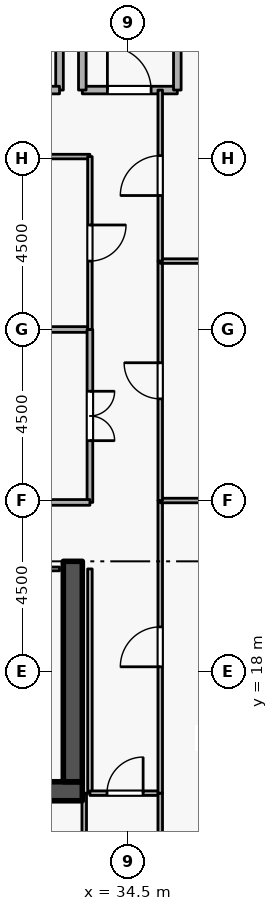
"""IFC4 building model, lengths in metres.
Left out: names, types, materials, properties, quantities, classifications, styles, units other than length and angle.
Written with IfcOpenShell. Run it as: python <this file> out.ifc"""

import sys

from ifc_helpers import new_model, si_unit, direction, frame, frame_2d, origin, place, context, subcontext, project, spatial, rectangle, extrude, element, fill, save


model = new_model("IFC4")
c1 = context("Model", 3, precision=1e-05, world=origin(), true_north=direction((0.0, 1.0)))
c2 = subcontext(c1, "Body", "Model", "MODEL_VIEW")
j1 = project(units=[si_unit("LENGTHUNIT", "METRE"), si_unit("PLANEANGLEUNIT", "RADIAN")], contexts=[c1])
p1 = place(None, origin())
s1 = spatial("IfcSite", under=j1, at=p1, CompositionType="ELEMENT")
p2 = place(p1, origin())
s2 = spatial("IfcBuilding", under=s1, at=p2, CompositionType="ELEMENT")
p3 = place(p2, frame((0.0, 0.0, 240.3)))
s3 = spatial("IfcBuildingStorey", under=s2, at=p3, CompositionType="ELEMENT", Elevation=240.3)
p4 = place(p3, frame((17.7, 14.85, 0.0), z_axis=(0.0, 0.0, 1.0), x_axis=(1.0, 0.0, 0.0)))
e1 = element("IfcWall", 1, at=p4, inside=s3, PredefinedType="SHEAR", context=c2, shape_type="SweptSolid", body=[
    extrude(rectangle(XDim=15.6, YDim=0.5, at=frame_2d((7.8, 0.0))), origin(), (0.0, 0.0, 1.0), 3.6),
])
p5 = place(p3, frame((33.05, 15.1, 0.0), z_axis=(0.0, 0.0, 1.0), x_axis=(0.0, 1.0, 0.0)))
e2 = element("IfcWall", 2, at=p5, inside=s3, PredefinedType="SHEAR", context=c2, shape_type="SweptSolid", body=[
    extrude(rectangle(XDim=5.8, YDim=0.5, at=frame_2d((2.9, 0.0))), origin(), (0.0, 0.0, 1.0), 3.6),
])
p6 = place(p3, frame((33.3, 33.3, 0.0), z_axis=(0.0, 0.0, 1.0), x_axis=(1.0, 0.0, 0.0)))
e3 = element("IfcWall", 3, at=p6, inside=s3, PredefinedType="STANDARD", context=c2, shape_type="SweptSolid", body=[
    extrude(rectangle(XDim=2.5, YDim=0.2, at=frame_2d((1.25, 0.0))), origin(), (0.0, 0.0, 1.0), 3.34),
])
p7 = place(p6, frame((0.66, 0.0, 0.0)))
e4 = element("IfcOpeningElement", 4, at=p7, cuts=e3, PredefinedType="OPENING", context=c2, shape_type="SweptSolid", body=[
    extrude(rectangle(XDim=1.15, YDim=2.1, at=frame_2d((0.575, 1.05))), frame((0.0, 0.11, 0.0), z_axis=(0.0, -1.0, 0.0), x_axis=(1.0, 0.0, 0.0)), (0.0, 0.0, 1.0), 0.22),
])
p8 = place(p3, frame((35.8, 33.3, 0.0), z_axis=(0.0, 0.0, 1.0), x_axis=(0.0, 1.0, 0.0)))
e5 = element("IfcWall", 5, at=p8, inside=s3, PredefinedType="STANDARD", context=c2, shape_type="SweptSolid", body=[
    extrude(rectangle(XDim=5.7, YDim=0.2, at=frame_2d((2.85, 0.0))), origin(), (0.0, 0.0, 1.0), 3.34),
])
p9 = place(p3, frame((33.3, 35.6, 0.0), z_axis=(0.0, 0.0, 1.0), x_axis=(0.0, -1.0, 0.0)))
e6 = element("IfcWall", 6, at=p9, inside=s3, PredefinedType="STANDARD", context=c2, shape_type="SweptSolid", body=[
    extrude(rectangle(XDim=2.3, YDim=0.2, at=frame_2d((1.15, 0.0))), origin(), (0.0, 0.0, 1.0), 2.545),
])
p10 = place(p3, frame((32.7, 35.35, 0.0), z_axis=(0.0, 0.0, 1.0), x_axis=(0.0, -1.0, 0.0)))
e7 = element("IfcWall", 7, at=p10, inside=s3, PredefinedType="STANDARD", context=c2, shape_type="SweptSolid", body=[
    extrude(rectangle(XDim=2.05, YDim=0.2, at=frame_2d((1.025, 0.0))), origin(), (0.0, 0.0, 1.0), 2.545),
])
p11 = place(p3, frame((32.7, 33.3, 0.0), z_axis=(0.0, 0.0, 1.0), x_axis=(-1.0, 0.0, 0.0)))
e8 = element("IfcWall", 8, at=p11, inside=s3, PredefinedType="STANDARD", context=c2, shape_type="SweptSolid", body=[
    extrude(rectangle(XDim=2.35, YDim=0.2, at=frame_2d((1.175, 0.0))), origin(), (0.0, 0.0, 1.0), 3.34),
])
p12 = place(p11, frame((0.6, 0.0, 0.0)))
e9 = element("IfcOpeningElement", 9, at=p12, cuts=e8, PredefinedType="OPENING", context=c2, shape_type="SweptSolid", body=[
    extrude(rectangle(XDim=1.15, YDim=2.1, at=frame_2d((0.575, 1.05))), frame((0.0, 0.11, 0.0), z_axis=(0.0, -1.0, 0.0), x_axis=(1.0, 0.0, 0.0)), (0.0, 0.0, 1.0), 0.22),
])
p13 = place(p3, frame((30.55, 20.7, 0.0), z_axis=(0.0, 0.0, 1.0), x_axis=(1.0, 0.0, 0.0)))
e10 = element("IfcWall", 10, at=p13, inside=s3, PredefinedType="PARTITIONING", context=c2, shape_type="SweptSolid", body=[
    extrude(rectangle(XDim=2.15, YDim=0.1, at=frame_2d((1.075, 0.0))), origin(), (0.0, 0.0, 1.0), 3.34),
])
p14 = place(p13, frame((0.6, 0.0, 0.0)))
e11 = element("IfcOpeningElement", 11, at=p14, cuts=e10, PredefinedType="OPENING", context=c2, shape_type="SweptSolid", body=[
    extrude(rectangle(XDim=0.95, YDim=2.1, at=frame_2d((0.475, 1.05))), frame((0.0, 0.06, 0.0), z_axis=(0.0, -1.0, 0.0), x_axis=(1.0, 0.0, 0.0)), (0.0, 0.0, 1.0), 0.12),
])
p15 = place(p3, frame((33.5, 20.7, 0.0), z_axis=(0.0, 0.0, 1.0), x_axis=(0.0, -1.0, 0.0)))
e12 = element("IfcWall", 12, at=p15, inside=s3, PredefinedType="PARTITIONING", context=c2, shape_type="SweptSolid", body=[
    extrude(rectangle(XDim=5.9, YDim=0.12, at=frame_2d((2.95, 0.0))), origin(), (0.0, 0.0, 1.0), 3.34),
])
p16 = place(p3, frame((33.5, 14.8, 0.0), z_axis=(0.0, 0.0, 1.0), x_axis=(1.0, 0.0, 0.0)))
e13 = element("IfcWall", 13, at=p16, inside=s3, PredefinedType="PARTITIONING", context=c2, shape_type="SweptSolid", body=[
    extrude(rectangle(XDim=1.85, YDim=0.12, at=frame_2d((0.925, 0.0))), origin(), (0.0, 0.0, 1.0), 3.34),
])
p17 = place(p16, frame((0.45, 0.0, 0.0)))
e14 = element("IfcOpeningElement", 14, at=p17, cuts=e13, PredefinedType="OPENING", context=c2, shape_type="SweptSolid", body=[
    extrude(rectangle(XDim=0.95, YDim=2.1, at=frame_2d((0.475, 1.05))), frame((0.0, 0.07, 0.0), z_axis=(0.0, -1.0, 0.0), x_axis=(1.0, 0.0, 0.0)), (0.0, 0.0, 1.0), 0.14),
])
for number, where, z_axis, x_axis in (
    (15, (35.35, 14.8, 0.0), (0.0, 0.0, 1.0), (0.0, -1.0, 0.0)),
    (16, (33.35, 3.28, 0.0), (0.0, 0.0, 1.0), (0.0, 1.0, 0.0)),
):
    element("IfcWall", number, at=place(p3, frame(where, z_axis=z_axis, x_axis=x_axis)), inside=s3, PredefinedType="PARTITIONING", context=c2, shape_type="SweptSolid", body=[
        extrude(rectangle(XDim=11.52, YDim=0.12, at=frame_2d((5.76, 0.0))), origin(), (0.0, 0.0, 1.0), 3.34),
    ])
p18 = place(p3, frame((35.35, 14.8, 0.0), z_axis=(0.0, 0.0, 1.0), x_axis=(0.0, 1.0, 0.0)))
e17 = element("IfcWall", 17, at=p18, inside=s3, PredefinedType="PARTITIONING", context=c2, shape_type="SweptSolid", body=[
    extrude(rectangle(XDim=7.7, YDim=0.12, at=frame_2d((3.85, 0.0))), origin(), (0.0, 0.0, 1.0), 3.34),
])
p19 = place(p18, frame((3.325, 0.0, 0.0)))
e18 = element("IfcOpeningElement", 18, at=p19, cuts=e17, PredefinedType="OPENING", context=c2, shape_type="SweptSolid", body=[
    extrude(rectangle(XDim=1.05, YDim=2.1, at=frame_2d((0.525, 1.05))), frame((0.0, 0.07, 0.0), z_axis=(0.0, -1.0, 0.0), x_axis=(1.0, 0.0, 0.0)), (0.0, 0.0, 1.0), 0.14),
])
p20 = place(p3, frame((35.35, 22.5, 0.0), z_axis=(0.0, 0.0, 1.0), x_axis=(1.0, 0.0, 0.0)))
e19 = element("IfcWall", 19, at=p20, inside=s3, PredefinedType="PARTITIONING", context=c2, shape_type="SweptSolid", body=[
    extrude(rectangle(XDim=7.87, YDim=0.12, at=frame_2d((3.935, 0.0))), origin(), (0.0, 0.0, 1.0), 3.34),
])
p21 = place(p3, frame((35.35, 22.5, 0.0), z_axis=(0.0, 0.0, 1.0), x_axis=(0.0, 1.0, 0.0)))
e20 = element("IfcWall", 20, at=p21, inside=s3, PredefinedType="PARTITIONING", context=c2, shape_type="SweptSolid", body=[
    extrude(rectangle(XDim=6.3, YDim=0.12, at=frame_2d((3.15, 0.0))), origin(), (0.0, 0.0, 1.0), 3.34),
])
p22 = place(p21, frame((2.675, 0.0, 0.0)))
e21 = element("IfcOpeningElement", 21, at=p22, cuts=e20, PredefinedType="OPENING", context=c2, shape_type="SweptSolid", body=[
    extrude(rectangle(XDim=0.95, YDim=2.1, at=frame_2d((0.475, 1.05))), frame((0.0, 0.07, 0.0), z_axis=(0.0, -1.0, 0.0), x_axis=(1.0, 0.0, 0.0)), (0.0, 0.0, 1.0), 0.14),
])
p23 = place(p3, frame((35.35, 28.8, 0.0), z_axis=(0.0, 0.0, 1.0), x_axis=(1.0, 0.0, 0.0)))
e22 = element("IfcWall", 22, at=p23, inside=s3, PredefinedType="PARTITIONING", context=c2, shape_type="SweptSolid", body=[
    extrude(rectangle(XDim=7.87, YDim=0.12, at=frame_2d((3.935, 0.0))), origin(), (0.0, 0.0, 1.0), 3.34),
])
p24 = place(p3, frame((35.35, 28.8, 0.0), z_axis=(0.0, 0.0, 1.0), x_axis=(0.0, 1.0, 0.0)))
e23 = element("IfcWall", 23, at=p24, inside=s3, PredefinedType="PARTITIONING", context=c2, shape_type="SweptSolid", body=[
    extrude(rectangle(XDim=4.5, YDim=0.12, at=frame_2d((2.25, 0.0))), origin(), (0.0, 0.0, 1.0), 3.34),
])
p25 = place(p24, frame((1.725, 0.0, 0.0)))
e24 = element("IfcOpeningElement", 24, at=p25, cuts=e23, PredefinedType="OPENING", context=c2, shape_type="SweptSolid", body=[
    extrude(rectangle(XDim=1.05, YDim=2.1, at=frame_2d((0.525, 1.05))), frame((0.0, 0.07, 0.0), z_axis=(0.0, -1.0, 0.0), x_axis=(1.0, 0.0, 0.0)), (0.0, 0.0, 1.0), 0.14),
])
p26 = place(p3, frame((30.7, 27.0, 0.0), z_axis=(0.0, 0.0, 1.0), x_axis=(1.0, 0.0, 0.0)))
e25 = element("IfcWall", 25, at=p26, inside=s3, PredefinedType="PARTITIONING", context=c2, shape_type="SweptSolid", body=[
    extrude(rectangle(XDim=2.8, YDim=0.15, at=frame_2d((1.4, 0.0))), origin(), (0.0, 0.0, 1.0), 2.878),
])
p27 = place(p3, frame((33.5, 27.0, 0.0), z_axis=(0.0, 0.0, 1.0), x_axis=(0.0, -1.0, 0.0)))
e26 = element("IfcWall", 26, at=p27, inside=s3, PredefinedType="PARTITIONING", context=c2, shape_type="SweptSolid", body=[
    extrude(rectangle(XDim=4.55, YDim=0.15, at=frame_2d((2.275, 0.0))), origin(), (0.0, 0.0, 1.0), 3.34),
])
p28 = place(p27, frame((1.625, 0.0, 0.0)))
e27 = element("IfcOpeningElement", 27, at=p28, cuts=e26, PredefinedType="OPENING", context=c2, shape_type="SweptSolid", body=[
    extrude(rectangle(XDim=1.3, YDim=2.12, at=frame_2d((0.65, 1.06))), frame((0.0, 0.085, 0.0), z_axis=(0.0, -1.0, 0.0), x_axis=(1.0, 0.0, 0.0)), (0.0, 0.0, 1.0), 0.17),
])
p29 = place(p3, frame((33.5, 22.45, 0.0), z_axis=(0.0, 0.0, 1.0), x_axis=(-1.0, 0.0, 0.0)))
e28 = element("IfcWall", 28, at=p29, inside=s3, PredefinedType="PARTITIONING", context=c2, shape_type="SweptSolid", body=[
    extrude(rectangle(XDim=2.8, YDim=0.15, at=frame_2d((1.4, 0.0))), origin(), (0.0, 0.0, 1.0), 3.34),
])
p30 = place(p3, frame((30.7, 31.55, 0.0), z_axis=(0.0, 0.0, 1.0), x_axis=(1.0, 0.0, 0.0)))
e29 = element("IfcWall", 29, at=p30, inside=s3, PredefinedType="PARTITIONING", context=c2, shape_type="SweptSolid", body=[
    extrude(rectangle(XDim=2.8, YDim=0.12, at=frame_2d((1.4, 0.0))), origin(), (0.0, 0.0, 1.0), 3.34),
])
p31 = place(p3, frame((33.5, 31.55, 0.0), z_axis=(0.0, 0.0, 1.0), x_axis=(0.0, -1.0, 0.0)))
e30 = element("IfcWall", 30, at=p31, inside=s3, PredefinedType="PARTITIONING", context=c2, shape_type="SweptSolid", body=[
    extrude(rectangle(XDim=4.55, YDim=0.12, at=frame_2d((2.275, 0.0))), origin(), (0.0, 0.0, 1.0), 3.34),
])
p32 = place(p31, frame((1.8, 0.0, 0.0)))
e31 = element("IfcOpeningElement", 31, at=p32, cuts=e30, PredefinedType="OPENING", context=c2, shape_type="SweptSolid", body=[
    extrude(rectangle(XDim=0.95, YDim=2.1, at=frame_2d((0.475, 1.05))), frame((0.0, 0.07, 0.0), z_axis=(0.0, -1.0, 0.0), x_axis=(1.0, 0.0, 0.0)), (0.0, 0.0, 1.0), 0.14),
])
p33 = place(p7, origin())
e32 = element("IfcDoor", 32, at=p33, inside=s3, OperationType="SINGLE_SWING_LEFT", PredefinedType="DOOR", context=c2, shape_type="SweptSolid", body=[
    extrude(rectangle(XDim=1.15, YDim=2.1, at=frame_2d((0.575, 1.05))), frame((0.0, 0.025, 0.0), z_axis=(0.0, -1.0, 0.0), x_axis=(1.0, 0.0, 0.0)), (0.0, 0.0, 1.0), 0.05),
])
fill(e4, e32)
p34 = place(p17, origin())
e33 = element("IfcDoor", 33, at=p34, inside=s3, OperationType="SINGLE_SWING_RIGHT", PredefinedType="DOOR", context=c2, shape_type="SweptSolid", body=[
    extrude(rectangle(XDim=0.95, YDim=2.1, at=frame_2d((0.475, 1.05))), frame((0.0, 0.025, 0.0), z_axis=(0.0, -1.0, 0.0), x_axis=(1.0, 0.0, 0.0)), (0.0, 0.0, 1.0), 0.05),
])
fill(e14, e33)
p35 = place(p19, origin())
e34 = element("IfcDoor", 34, at=p35, inside=s3, OperationType="SINGLE_SWING_LEFT", PredefinedType="DOOR", context=c2, shape_type="SweptSolid", body=[
    extrude(rectangle(XDim=1.05, YDim=2.1, at=frame_2d((0.525, 1.05))), frame((0.0, 0.025, 0.0), z_axis=(0.0, -1.0, 0.0), x_axis=(1.0, 0.0, 0.0)), (0.0, 0.0, 1.0), 0.05),
])
fill(e18, e34)
p36 = place(p22, origin())
e35 = element("IfcDoor", 35, at=p36, inside=s3, OperationType="SINGLE_SWING_RIGHT", PredefinedType="DOOR", context=c2, shape_type="SweptSolid", body=[
    extrude(rectangle(XDim=0.95, YDim=2.1, at=frame_2d((0.475, 1.05))), frame((0.0, 0.025, 0.0), z_axis=(0.0, -1.0, 0.0), x_axis=(1.0, 0.0, 0.0)), (0.0, 0.0, 1.0), 0.05),
])
fill(e21, e35)
p37 = place(p25, origin())
e36 = element("IfcDoor", 36, at=p37, inside=s3, OperationType="SINGLE_SWING_LEFT", PredefinedType="DOOR", context=c2, shape_type="SweptSolid", body=[
    extrude(rectangle(XDim=1.05, YDim=2.1, at=frame_2d((0.525, 1.05))), frame((0.0, 0.025, 0.0), z_axis=(0.0, -1.0, 0.0), x_axis=(1.0, 0.0, 0.0)), (0.0, 0.0, 1.0), 0.05),
])
fill(e24, e36)
p38 = place(p28, origin())
e37 = element("IfcDoor", 37, at=p38, inside=s3, OperationType="DOUBLE_DOOR_SINGLE_SWING", PredefinedType="DOOR", context=c2, shape_type="SweptSolid", body=[
    extrude(rectangle(XDim=1.3, YDim=2.12, at=frame_2d((0.65, 1.06))), frame((0.0, 0.025, 0.0), z_axis=(0.0, -1.0, 0.0), x_axis=(1.0, 0.0, 0.0)), (0.0, 0.0, 1.0), 0.05),
])
fill(e27, e37)
p39 = place(p32, origin())
e38 = element("IfcDoor", 38, at=p39, inside=s3, OperationType="SINGLE_SWING_LEFT", PredefinedType="DOOR", context=c2, shape_type="SweptSolid", body=[
    extrude(rectangle(XDim=0.95, YDim=2.1, at=frame_2d((0.475, 1.05))), frame((0.0, 0.025, 0.0), z_axis=(0.0, -1.0, 0.0), x_axis=(1.0, 0.0, 0.0)), (0.0, 0.0, 1.0), 0.05),
])
fill(e31, e38)
save(model, sys.argv[1])
